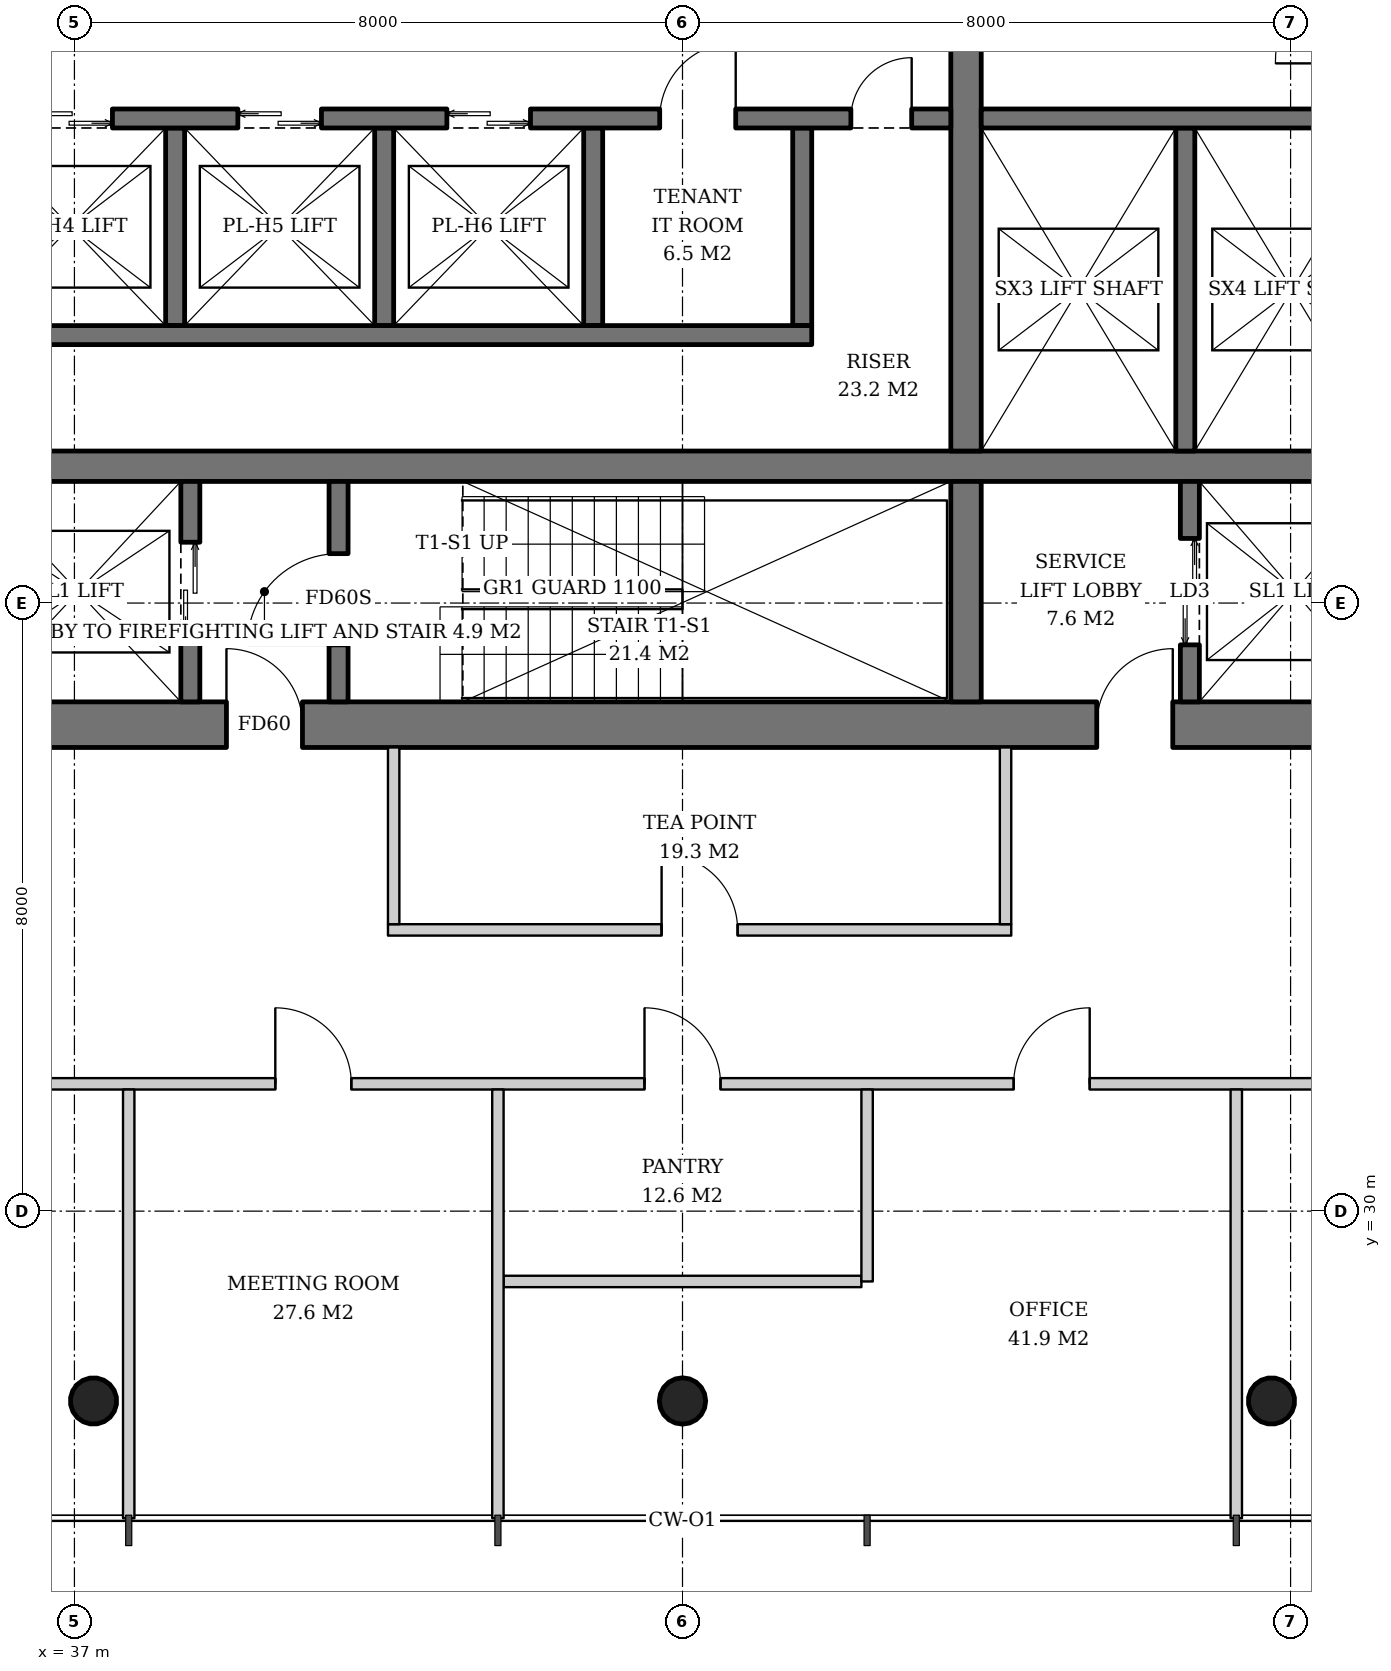
"""IFC4 building model, lengths in metres.
Left out: names, types, materials, properties, quantities, classifications, styles, units other than length and angle.
Written with IfcOpenShell. Run it as: python <this file> out.ifc"""

import sys

from ifc_helpers import new_model, si_unit, direction, frame, frame_2d, origin, origin_2d, place, context, subcontext, project, spatial, rectangle, hollow_circle, extrude, element, fill, save


model = new_model("IFC4")
c1 = context("Model", 3, precision=1e-05, world=origin(), true_north=direction((0.0, 1.0)))
c2 = subcontext(c1, "Body", "Model", "MODEL_VIEW")
j1 = project(units=[si_unit("LENGTHUNIT", "METRE"), si_unit("PLANEANGLEUNIT", "RADIAN")], contexts=[c1])
p1 = place(None, origin())
s1 = spatial("IfcSite", under=j1, at=p1, CompositionType="ELEMENT")
p2 = place(p1, origin())
s2 = spatial("IfcBuilding", under=s1, at=p2, CompositionType="ELEMENT")
p3 = place(p2, frame((0.0, 0.0, 192.0)))
s3 = spatial("IfcBuildingStorey", under=s2, at=p3, CompositionType="ELEMENT", Elevation=192.0)
p4 = place(p3, frame((37.232, 27.464, 0.0), z_axis=(0.015987237665, 0.031910269556, 0.999362868496), x_axis=(-0.894067115991, 0.447933021895, 0.0)))
e1 = element("IfcColumn", 1, at=p4, inside=s3, PredefinedType="COLUMN", context=c2, shape_type="SweptSolid", body=[
    extrude(hollow_circle(Radius=0.305, WallThickness=0.025, at=origin_2d()), origin(), (0.0, 0.0, 1.0), 3.802),
])
p5 = place(p3, frame((45.0, 27.464, 0.0), z_axis=(0.0, 0.031914348339, 0.999490607445), x_axis=(-1.0, 0.0, 0.0)))
e2 = element("IfcColumn", 2, at=p5, inside=s3, PredefinedType="COLUMN", context=c2, shape_type="SweptSolid", body=[
    extrude(hollow_circle(Radius=0.305, WallThickness=0.025, at=origin_2d()), origin(), (0.0, 0.0, 1.0), 3.802),
])
p6 = place(p3, frame((52.768, 27.464, 0.0), z_axis=(-0.015987237665, 0.031910269556, 0.999362868496), x_axis=(-0.894067115991, -0.447933021895, 0.0)))
e3 = element("IfcColumn", 3, at=p6, inside=s3, PredefinedType="COLUMN", context=c2, shape_type="SweptSolid", body=[
    extrude(hollow_circle(Radius=0.305, WallThickness=0.025, at=origin_2d()), origin(), (0.0, 0.0, 1.0), 3.802),
])
p7 = place(p3, frame((35.1, 36.4, 0.0), z_axis=(0.0, 0.0, 1.0), x_axis=(1.0, 0.0, 0.0)))
e4 = element("IfcWall", 4, at=p7, inside=s3, PredefinedType="SHEAR", context=c2, shape_type="SweptSolid", body=[
    extrude(rectangle(XDim=19.8, YDim=0.6, at=frame_2d((9.9, 0.0))), origin(), (0.0, 0.0, 1.0), 3.8),
])
p8 = place(p7, frame((3.9, 0.0, 0.0)))
e5 = element("IfcOpeningElement", 5, at=p8, cuts=e4, PredefinedType="OPENING", context=c2, shape_type="SweptSolid", body=[
    extrude(rectangle(XDim=1.0, YDim=2.1, at=frame_2d((0.5, 1.05))), frame((0.0, 0.31, 0.0), z_axis=(0.0, -1.0, 0.0), x_axis=(1.0, 0.0, 0.0)), (0.0, 0.0, 1.0), 0.62),
])
p9 = place(p7, frame((15.35, 0.0, 0.0)))
e6 = element("IfcOpeningElement", 6, at=p9, cuts=e4, PredefinedType="OPENING", context=c2, shape_type="SweptSolid", body=[
    extrude(rectangle(XDim=1.0, YDim=2.1, at=frame_2d((0.5, 1.05))), frame((0.0, 0.31, 0.0), z_axis=(0.0, -1.0, 0.0), x_axis=(1.0, 0.0, 0.0)), (0.0, 0.0, 1.0), 0.62),
])
p10 = place(p3, frame((35.7, 39.8, 0.0), z_axis=(0.0, 0.0, 1.0), x_axis=(1.0, 0.0, 0.0)))
e7 = element("IfcWall", 7, at=p10, inside=s3, PredefinedType="SHEAR", context=c2, shape_type="SweptSolid", body=[
    extrude(rectangle(XDim=18.6, YDim=0.4, at=frame_2d((9.3, 0.0))), origin(), (0.0, 0.0, 1.0), 3.8),
])
p11 = place(p3, frame((48.73, 36.7, 0.0), z_axis=(0.0, 0.0, 1.0), x_axis=(0.0, 1.0, 0.0)))
e8 = element("IfcWall", 8, at=p11, inside=s3, PredefinedType="SHEAR", context=c2, shape_type="SweptSolid", body=[
    extrude(rectangle(XDim=2.9, YDim=0.4, at=frame_2d((1.45, 0.0))), origin(), (0.0, 0.0, 1.0), 3.8),
])
p12 = place(p3, frame((48.73, 40.0, 0.0), z_axis=(0.0, 0.0, 1.0), x_axis=(0.0, 1.0, 0.0)))
e9 = element("IfcWall", 9, at=p12, inside=s3, PredefinedType="SHEAR", context=c2, shape_type="SweptSolid", body=[
    extrude(rectangle(XDim=12.0, YDim=0.4, at=frame_2d((6.0, 0.0))), origin(), (0.0, 0.0, 1.0), 3.8),
])
p13 = place(p3, frame((38.525, 36.7, 0.0), z_axis=(0.0, 0.0, 1.0), x_axis=(0.0, 1.0, 0.0)))
e10 = element("IfcWall", 10, at=p13, inside=s3, PredefinedType="SHEAR", context=c2, shape_type="SweptSolid", body=[
    extrude(rectangle(XDim=2.9, YDim=0.25, at=frame_2d((1.45, 0.0))), origin(), (0.0, 0.0, 1.0), 3.8),
])
p14 = place(p13, frame((0.8, 0.0, 0.0)))
e11 = element("IfcOpeningElement", 11, at=p14, cuts=e10, PredefinedType="OPENING", context=c2, shape_type="SweptSolid", body=[
    extrude(rectangle(XDim=1.3, YDim=2.2, at=frame_2d((0.65, 1.1))), frame((0.0, 0.135, 0.0), z_axis=(0.0, -1.0, 0.0), x_axis=(1.0, 0.0, 0.0)), (0.0, 0.0, 1.0), 0.27),
])
p15 = place(p3, frame((40.475, 36.7, 0.0), z_axis=(0.0, 0.0, 1.0), x_axis=(0.0, 1.0, 0.0)))
e12 = element("IfcWall", 12, at=p15, inside=s3, PredefinedType="SHEAR", context=c2, shape_type="SweptSolid", body=[
    extrude(rectangle(XDim=2.9, YDim=0.25, at=frame_2d((1.45, 0.0))), origin(), (0.0, 0.0, 1.0), 3.8),
])
p16 = place(p15, frame((0.75, 0.0, 0.0)))
e13 = element("IfcOpeningElement", 13, at=p16, cuts=e12, PredefinedType="OPENING", context=c2, shape_type="SweptSolid", body=[
    extrude(rectangle(XDim=1.2, YDim=2.1, at=frame_2d((0.6, 1.05))), frame((0.0, 0.135, 0.0), z_axis=(0.0, -1.0, 0.0), x_axis=(1.0, 0.0, 0.0)), (0.0, 0.0, 1.0), 0.27),
])
p17 = place(p3, frame((51.675, 36.7, 0.0), z_axis=(0.0, 0.0, 1.0), x_axis=(0.0, 1.0, 0.0)))
e14 = element("IfcWall", 14, at=p17, inside=s3, PredefinedType="SHEAR", context=c2, shape_type="SweptSolid", body=[
    extrude(rectangle(XDim=2.9, YDim=0.25, at=frame_2d((1.45, 0.0))), origin(), (0.0, 0.0, 1.0), 3.8),
])
p18 = place(p17, frame((0.75, 0.0, 0.0)))
e15 = element("IfcOpeningElement", 15, at=p18, cuts=e14, PredefinedType="OPENING", context=c2, shape_type="SweptSolid", body=[
    extrude(rectangle(XDim=1.4, YDim=2.4, at=frame_2d((0.7, 1.2))), frame((0.0, 0.135, 0.0), z_axis=(0.0, -1.0, 0.0), x_axis=(1.0, 0.0, 0.0)), (0.0, 0.0, 1.0), 0.27),
])
for number, where, z_axis, x_axis in (
    (16, (38.325, 44.25, 0.0), (0.0, 0.0, 1.0), (0.0, -1.0, 0.0)),
    (17, (41.075, 44.25, 0.0), (0.0, 0.0, 1.0), (0.0, -1.0, 0.0)),
    (18, (43.825, 44.25, 0.0), (0.0, 0.0, 1.0), (0.0, -1.0, 0.0)),
    (19, (46.575, 44.25, 0.0), (0.0, 0.0, 1.0), (0.0, -1.0, 0.0)),
):
    element("IfcWall", number, at=place(p3, frame(where, z_axis=z_axis, x_axis=x_axis)), inside=s3, PredefinedType="SHEAR", context=c2, shape_type="SweptSolid", body=[
        extrude(rectangle(XDim=2.6, YDim=0.25, at=frame_2d((1.3, 0.0))), origin(), (0.0, 0.0, 1.0), 3.8),
    ])
p19 = place(p3, frame((35.7, 41.525, 0.0), z_axis=(0.0, 0.0, 1.0), x_axis=(1.0, 0.0, 0.0)))
e20 = element("IfcWall", 20, at=p19, inside=s3, PredefinedType="SHEAR", context=c2, shape_type="SweptSolid", body=[
    extrude(rectangle(XDim=11.0, YDim=0.25, at=frame_2d((5.5, 0.0))), origin(), (0.0, 0.0, 1.0), 3.8),
])
p20 = place(p3, frame((35.7, 44.375, 0.0), z_axis=(0.0, 0.0, 1.0), x_axis=(1.0, 0.0, 0.0)))
e21 = element("IfcWall", 21, at=p20, inside=s3, PredefinedType="SHEAR", context=c2, shape_type="SweptSolid", body=[
    extrude(rectangle(XDim=12.83, YDim=0.25, at=frame_2d((6.415, 0.0))), origin(), (0.0, 0.0, 1.0), 3.8),
])
p21 = place(p20, frame((0.7, 0.0, 0.0)))
e22 = element("IfcOpeningElement", 22, at=p21, cuts=e21, PredefinedType="OPENING", context=c2, shape_type="SweptSolid", body=[
    extrude(rectangle(XDim=1.1, YDim=2.2, at=frame_2d((0.55, 1.1))), frame((0.0, 0.135, 0.0), z_axis=(0.0, -1.0, 0.0), x_axis=(1.0, 0.0, 0.0)), (0.0, 0.0, 1.0), 0.27),
])
p22 = place(p20, frame((3.45, 0.0, 0.0)))
e23 = element("IfcOpeningElement", 23, at=p22, cuts=e21, PredefinedType="OPENING", context=c2, shape_type="SweptSolid", body=[
    extrude(rectangle(XDim=1.1, YDim=2.2, at=frame_2d((0.55, 1.1))), frame((0.0, 0.135, 0.0), z_axis=(0.0, -1.0, 0.0), x_axis=(1.0, 0.0, 0.0)), (0.0, 0.0, 1.0), 0.27),
])
p23 = place(p20, frame((6.2, 0.0, 0.0)))
e24 = element("IfcOpeningElement", 24, at=p23, cuts=e21, PredefinedType="OPENING", context=c2, shape_type="SweptSolid", body=[
    extrude(rectangle(XDim=1.1, YDim=2.2, at=frame_2d((0.55, 1.1))), frame((0.0, 0.135, 0.0), z_axis=(0.0, -1.0, 0.0), x_axis=(1.0, 0.0, 0.0)), (0.0, 0.0, 1.0), 0.27),
])
p24 = place(p20, frame((9.0, 0.0, 0.0)))
e25 = element("IfcOpeningElement", 25, at=p24, cuts=e21, PredefinedType="OPENING", context=c2, shape_type="SweptSolid", body=[
    extrude(rectangle(XDim=1.0, YDim=2.1, at=frame_2d((0.5, 1.05))), frame((0.0, 0.135, 0.0), z_axis=(0.0, -1.0, 0.0), x_axis=(1.0, 0.0, 0.0)), (0.0, 0.0, 1.0), 0.27),
])
p25 = place(p20, frame((11.515, 0.0, 0.0)))
e26 = element("IfcOpeningElement", 26, at=p25, cuts=e21, PredefinedType="OPENING", context=c2, shape_type="SweptSolid", body=[
    extrude(rectangle(XDim=0.8, YDim=2.0, at=frame_2d((0.4, 1.0))), frame((0.0, 0.135, 0.0), z_axis=(0.0, -1.0, 0.0), x_axis=(1.0, 0.0, 0.0)), (0.0, 0.0, 1.0), 0.27),
])
p26 = place(p3, frame((51.615, 44.25, 0.0), z_axis=(0.0, 0.0, 1.0), x_axis=(0.0, -1.0, 0.0)))
e27 = element("IfcWall", 27, at=p26, inside=s3, PredefinedType="SHEAR", context=c2, shape_type="SweptSolid", body=[
    extrude(rectangle(XDim=4.25, YDim=0.25, at=frame_2d((2.125, 0.0))), origin(), (0.0, 0.0, 1.0), 3.8),
])
p27 = place(p3, frame((48.93, 44.375, 0.0), z_axis=(0.0, 0.0, 1.0), x_axis=(1.0, 0.0, 0.0)))
e28 = element("IfcWall", 28, at=p27, inside=s3, PredefinedType="SHEAR", context=c2, shape_type="SweptSolid", body=[
    extrude(rectangle(XDim=5.37, YDim=0.25, at=frame_2d((2.685, 0.0))), origin(), (0.0, 0.0, 1.0), 3.8),
])
p28 = place(p3, frame((41.125, 33.7, 0.0), z_axis=(0.0, 0.0, 1.0), x_axis=(1.0, 0.0, 0.0)))
e29 = element("IfcWall", 29, at=p28, inside=s3, PredefinedType="PARTITIONING", context=c2, shape_type="SweptSolid", body=[
    extrude(rectangle(XDim=8.2, YDim=0.15, at=frame_2d((4.1, 0.0))), origin(), (0.0, 0.0, 1.0), 2.867),
])
p29 = place(p28, frame((3.6, 0.0, 0.0)))
e30 = element("IfcOpeningElement", 30, at=p29, cuts=e29, PredefinedType="OPENING", context=c2, shape_type="SweptSolid", body=[
    extrude(rectangle(XDim=1.0, YDim=2.1, at=frame_2d((0.5, 1.05))), frame((0.0, 0.085, 0.0), z_axis=(0.0, -1.0, 0.0), x_axis=(1.0, 0.0, 0.0)), (0.0, 0.0, 1.0), 0.17),
])
for number, where, z_axis, x_axis in (
    (31, (41.2, 36.1, 0.0), (0.0, 0.0, 1.0), (0.0, -1.0, 0.0)),
    (32, (49.25, 36.1, 0.0), (0.0, 0.0, 1.0), (0.0, -1.0, 0.0)),
):
    element("IfcWall", number, at=place(p3, frame(where, z_axis=z_axis, x_axis=x_axis)), inside=s3, PredefinedType="PARTITIONING", context=c2, shape_type="SweptSolid", body=[
        extrude(rectangle(XDim=2.325, YDim=0.15, at=frame_2d((1.163, 0.0))), origin(), (0.0, 0.0, 1.0), 3.62),
    ])
p30 = place(p3, frame((42.646, 29.075, 0.0), z_axis=(0.0, 0.0, 1.0), x_axis=(1.0, 0.0, 0.0)))
e33 = element("IfcWall", 33, at=p30, inside=s3, PredefinedType="PARTITIONING", context=c2, shape_type="SweptSolid", body=[
    extrude(rectangle(XDim=4.707, YDim=0.15, at=frame_2d((2.354, 0.0))), origin(), (0.0, 0.0, 1.0), 2.867),
])
p31 = place(p3, frame((32.1, 31.675, 0.0), z_axis=(0.0, 0.0, 1.0), x_axis=(1.0, 0.0, 0.0)))
e34 = element("IfcWall", 34, at=p31, inside=s3, PredefinedType="PARTITIONING", context=c2, shape_type="SweptSolid", body=[
    extrude(rectangle(XDim=25.8, YDim=0.15, at=frame_2d((12.9, 0.0))), origin(), (0.0, 0.0, 1.0), 2.867),
])
p32 = place(p31, frame((2.686, 0.0, 0.0)))
e35 = element("IfcOpeningElement", 35, at=p32, cuts=e34, PredefinedType="OPENING", context=c2, shape_type="SweptSolid", body=[
    extrude(rectangle(XDim=1.0, YDim=2.1, at=frame_2d((0.5, 1.05))), frame((0.0, 0.085, 0.0), z_axis=(0.0, -1.0, 0.0), x_axis=(1.0, 0.0, 0.0)), (0.0, 0.0, 1.0), 0.17),
])
p33 = place(p31, frame((7.543, 0.0, 0.0)))
e36 = element("IfcOpeningElement", 36, at=p33, cuts=e34, PredefinedType="OPENING", context=c2, shape_type="SweptSolid", body=[
    extrude(rectangle(XDim=1.0, YDim=2.1, at=frame_2d((0.5, 1.05))), frame((0.0, 0.085, 0.0), z_axis=(0.0, -1.0, 0.0), x_axis=(1.0, 0.0, 0.0)), (0.0, 0.0, 1.0), 0.17),
])
p34 = place(p31, frame((12.4, 0.0, 0.0)))
e37 = element("IfcOpeningElement", 37, at=p34, cuts=e34, PredefinedType="OPENING", context=c2, shape_type="SweptSolid", body=[
    extrude(rectangle(XDim=1.0, YDim=2.1, at=frame_2d((0.5, 1.05))), frame((0.0, 0.085, 0.0), z_axis=(0.0, -1.0, 0.0), x_axis=(1.0, 0.0, 0.0)), (0.0, 0.0, 1.0), 0.17),
])
p35 = place(p31, frame((17.257, 0.0, 0.0)))
e38 = element("IfcOpeningElement", 38, at=p35, cuts=e34, PredefinedType="OPENING", context=c2, shape_type="SweptSolid", body=[
    extrude(rectangle(XDim=1.0, YDim=2.1, at=frame_2d((0.5, 1.05))), frame((0.0, 0.085, 0.0), z_axis=(0.0, -1.0, 0.0), x_axis=(1.0, 0.0, 0.0)), (0.0, 0.0, 1.0), 0.17),
])
p36 = place(p31, frame((22.114, 0.0, 0.0)))
e39 = element("IfcOpeningElement", 39, at=p36, cuts=e34, PredefinedType="OPENING", context=c2, shape_type="SweptSolid", body=[
    extrude(rectangle(XDim=1.0, YDim=2.1, at=frame_2d((0.5, 1.05))), frame((0.0, 0.085, 0.0), z_axis=(0.0, -1.0, 0.0), x_axis=(1.0, 0.0, 0.0)), (0.0, 0.0, 1.0), 0.17),
])
for number, where, z_axis, x_axis in (
    (40, (37.714, 31.6, 0.0), (0.0, 0.0, 1.0), (0.0, -1.0, 0.0)),
    (41, (42.572, 31.6, 0.0), (0.0, 0.0, 1.0), (0.0, -1.0, 0.0)),
):
    element("IfcWall", number, at=place(p3, frame(where, z_axis=z_axis, x_axis=x_axis)), inside=s3, PredefinedType="PARTITIONING", context=c2, shape_type="SweptSolid", body=[
        extrude(rectangle(XDim=5.64, YDim=0.15, at=frame_2d((2.82, 0.0))), origin(), (0.0, 0.0, 1.0), 3.12),
    ])
p37 = place(p3, frame((47.428, 31.6, 0.0), z_axis=(0.0, 0.0, 1.0), x_axis=(0.0, -1.0, 0.0)))
e42 = element("IfcWall", 42, at=p37, inside=s3, PredefinedType="PARTITIONING", context=c2, shape_type="SweptSolid", body=[
    extrude(rectangle(XDim=2.525, YDim=0.15, at=frame_2d((1.263, 0.0))), origin(), (0.0, 0.0, 1.0), 2.867),
])
p38 = place(p3, frame((52.286, 31.6, 0.0), z_axis=(0.0, 0.0, 1.0), x_axis=(0.0, -1.0, 0.0)))
e43 = element("IfcWall", 43, at=p38, inside=s3, PredefinedType="PARTITIONING", context=c2, shape_type="SweptSolid", body=[
    extrude(rectangle(XDim=5.64, YDim=0.15, at=frame_2d((2.82, 0.0))), origin(), (0.0, 0.0, 1.0), 3.12),
])
p39 = place(p14, origin())
e44 = element("IfcDoor", 44, at=p39, inside=s3, OperationType="DOUBLE_DOOR_SLIDING", PredefinedType="DOOR", context=c2, shape_type="SweptSolid", body=[
    extrude(rectangle(XDim=1.3, YDim=2.2, at=frame_2d((0.65, 1.1))), frame((0.0, 0.025, 0.0), z_axis=(0.0, -1.0, 0.0), x_axis=(1.0, 0.0, 0.0)), (0.0, 0.0, 1.0), 0.05),
])
fill(e11, e44)
p40 = place(p16, origin())
e45 = element("IfcDoor", 45, at=p40, inside=s3, OperationType="SINGLE_SWING_LEFT", PredefinedType="DOOR", context=c2, shape_type="SweptSolid", body=[
    extrude(rectangle(XDim=1.2, YDim=2.1, at=frame_2d((0.6, 1.05))), frame((0.0, 0.025, 0.0), z_axis=(0.0, -1.0, 0.0), x_axis=(1.0, 0.0, 0.0)), (0.0, 0.0, 1.0), 0.05),
])
fill(e13, e45)
p41 = place(p18, origin())
e46 = element("IfcDoor", 46, at=p41, inside=s3, OperationType="DOUBLE_DOOR_SLIDING", PredefinedType="DOOR", context=c2, shape_type="SweptSolid", body=[
    extrude(rectangle(XDim=1.4, YDim=2.4, at=frame_2d((0.7, 1.2))), frame((0.0, 0.025, 0.0), z_axis=(0.0, -1.0, 0.0), x_axis=(1.0, 0.0, 0.0)), (0.0, 0.0, 1.0), 0.05),
])
fill(e15, e46)
p42 = place(p21, origin())
e47 = element("IfcDoor", 47, at=p42, inside=s3, OperationType="DOUBLE_DOOR_SLIDING", PredefinedType="DOOR", context=c2, shape_type="SweptSolid", body=[
    extrude(rectangle(XDim=1.1, YDim=2.2, at=frame_2d((0.55, 1.1))), frame((0.0, 0.025, 0.0), z_axis=(0.0, -1.0, 0.0), x_axis=(1.0, 0.0, 0.0)), (0.0, 0.0, 1.0), 0.05),
])
fill(e22, e47)
p43 = place(p22, origin())
e48 = element("IfcDoor", 48, at=p43, inside=s3, OperationType="DOUBLE_DOOR_SLIDING", PredefinedType="DOOR", context=c2, shape_type="SweptSolid", body=[
    extrude(rectangle(XDim=1.1, YDim=2.2, at=frame_2d((0.55, 1.1))), frame((0.0, 0.025, 0.0), z_axis=(0.0, -1.0, 0.0), x_axis=(1.0, 0.0, 0.0)), (0.0, 0.0, 1.0), 0.05),
])
fill(e23, e48)
p44 = place(p23, origin())
e49 = element("IfcDoor", 49, at=p44, inside=s3, OperationType="DOUBLE_DOOR_SLIDING", PredefinedType="DOOR", context=c2, shape_type="SweptSolid", body=[
    extrude(rectangle(XDim=1.1, YDim=2.2, at=frame_2d((0.55, 1.1))), frame((0.0, 0.025, 0.0), z_axis=(0.0, -1.0, 0.0), x_axis=(1.0, 0.0, 0.0)), (0.0, 0.0, 1.0), 0.05),
])
fill(e24, e49)
p45 = place(p24, origin())
e50 = element("IfcDoor", 50, at=p45, inside=s3, OperationType="SINGLE_SWING_RIGHT", PredefinedType="DOOR", context=c2, shape_type="SweptSolid", body=[
    extrude(rectangle(XDim=1.0, YDim=2.1, at=frame_2d((0.5, 1.05))), frame((0.0, 0.025, 0.0), z_axis=(0.0, -1.0, 0.0), x_axis=(1.0, 0.0, 0.0)), (0.0, 0.0, 1.0), 0.05),
])
fill(e25, e50)
p46 = place(p25, origin())
e51 = element("IfcDoor", 51, at=p46, inside=s3, OperationType="SINGLE_SWING_RIGHT", PredefinedType="DOOR", context=c2, shape_type="SweptSolid", body=[
    extrude(rectangle(XDim=0.8, YDim=2.0, at=frame_2d((0.4, 1.0))), frame((0.0, 0.025, 0.0), z_axis=(0.0, -1.0, 0.0), x_axis=(1.0, 0.0, 0.0)), (0.0, 0.0, 1.0), 0.05),
])
fill(e26, e51)
p47 = place(p8, origin())
e52 = element("IfcDoor", 52, at=p47, inside=s3, OperationType="SINGLE_SWING_LEFT", PredefinedType="DOOR", context=c2, shape_type="SweptSolid", body=[
    extrude(rectangle(XDim=1.0, YDim=2.1, at=frame_2d((0.5, 1.05))), frame((0.0, 0.025, 0.0), z_axis=(0.0, -1.0, 0.0), x_axis=(1.0, 0.0, 0.0)), (0.0, 0.0, 1.0), 0.05),
])
fill(e5, e52)
p48 = place(p9, origin())
e53 = element("IfcDoor", 53, at=p48, inside=s3, OperationType="SINGLE_SWING_RIGHT", PredefinedType="DOOR", context=c2, shape_type="SweptSolid", body=[
    extrude(rectangle(XDim=1.0, YDim=2.1, at=frame_2d((0.5, 1.05))), frame((0.0, 0.025, 0.0), z_axis=(0.0, -1.0, 0.0), x_axis=(1.0, 0.0, 0.0)), (0.0, 0.0, 1.0), 0.05),
])
fill(e6, e53)
p49 = place(p29, origin())
e54 = element("IfcDoor", 54, at=p49, inside=s3, OperationType="SINGLE_SWING_LEFT", PredefinedType="DOOR", context=c2, shape_type="SweptSolid", body=[
    extrude(rectangle(XDim=1.0, YDim=2.1, at=frame_2d((0.5, 1.05))), frame((0.0, 0.025, 0.0), z_axis=(0.0, -1.0, 0.0), x_axis=(1.0, 0.0, 0.0)), (0.0, 0.0, 1.0), 0.05),
])
fill(e30, e54)
p50 = place(p33, origin())
e55 = element("IfcDoor", 55, at=p50, inside=s3, OperationType="SINGLE_SWING_LEFT", PredefinedType="DOOR", context=c2, shape_type="SweptSolid", body=[
    extrude(rectangle(XDim=1.0, YDim=2.1, at=frame_2d((0.5, 1.05))), frame((0.0, 0.025, 0.0), z_axis=(0.0, -1.0, 0.0), x_axis=(1.0, 0.0, 0.0)), (0.0, 0.0, 1.0), 0.05),
])
fill(e36, e55)
p51 = place(p34, origin())
e56 = element("IfcDoor", 56, at=p51, inside=s3, OperationType="SINGLE_SWING_LEFT", PredefinedType="DOOR", context=c2, shape_type="SweptSolid", body=[
    extrude(rectangle(XDim=1.0, YDim=2.1, at=frame_2d((0.5, 1.05))), frame((0.0, 0.025, 0.0), z_axis=(0.0, -1.0, 0.0), x_axis=(1.0, 0.0, 0.0)), (0.0, 0.0, 1.0), 0.05),
])
fill(e37, e56)
p52 = place(p35, origin())
e57 = element("IfcDoor", 57, at=p52, inside=s3, OperationType="SINGLE_SWING_RIGHT", PredefinedType="DOOR", context=c2, shape_type="SweptSolid", body=[
    extrude(rectangle(XDim=1.0, YDim=2.1, at=frame_2d((0.5, 1.05))), frame((0.0, 0.025, 0.0), z_axis=(0.0, -1.0, 0.0), x_axis=(1.0, 0.0, 0.0)), (0.0, 0.0, 1.0), 0.05),
])
fill(e38, e57)
save(model, sys.argv[1])
